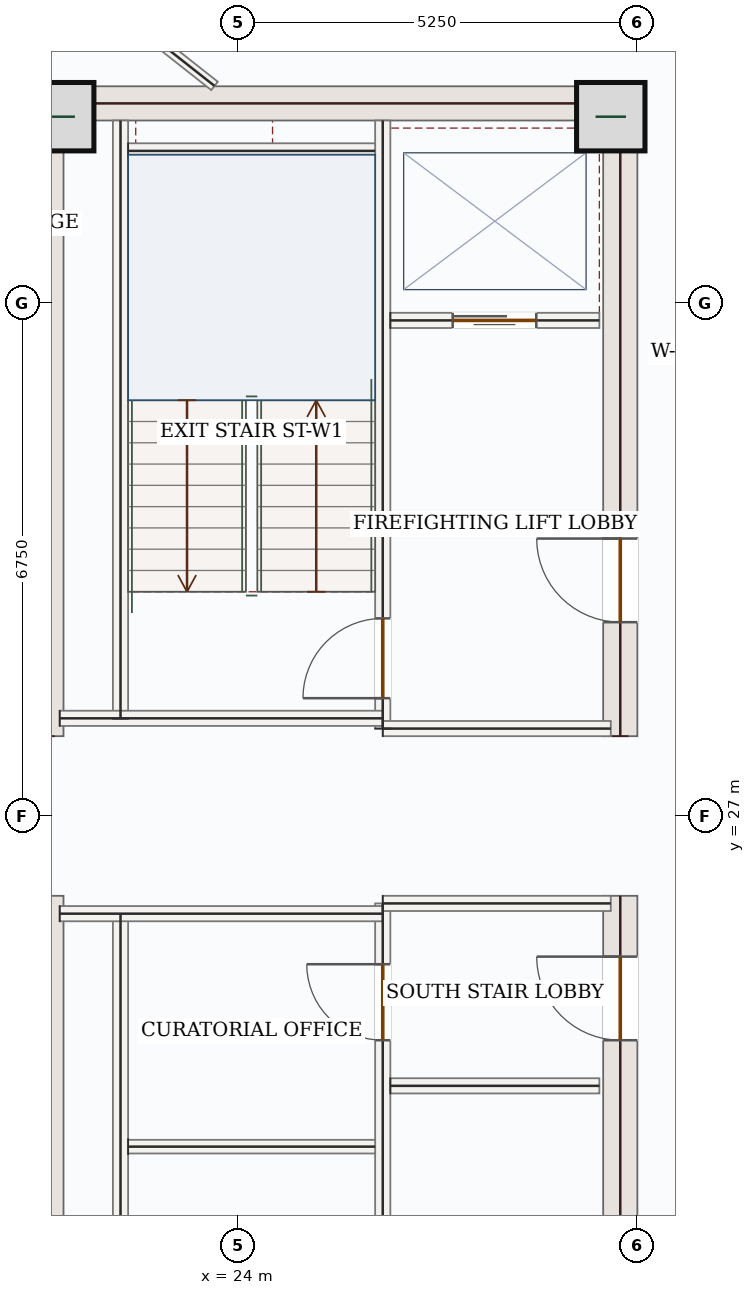
"""IFC4 building model, lengths in metres.
Left out: names, types, materials, properties, quantities, classifications, styles, units other than length and angle.
Written with IfcOpenShell. Run it as: python <this file> out.ifc"""

import sys

from ifc_helpers import new_model, si_unit, direction, frame, frame_2d, origin, origin_2d, place, context, subcontext, project, spatial, rectangle, extrude, source, transform, mapped, element, fill, save


model = new_model("IFC4")
c1 = context("Model", 3, precision=1e-05, world=origin(), true_north=direction((0.0, 1.0)))
c2 = subcontext(c1, "Body", "Model", "MODEL_VIEW")
j1 = project(units=[si_unit("LENGTHUNIT", "METRE"), si_unit("PLANEANGLEUNIT", "RADIAN")], contexts=[c1])
p1 = place(None, origin())
s1 = spatial("IfcSite", under=j1, at=p1, CompositionType="ELEMENT")
p2 = place(p1, origin())
s2 = spatial("IfcBuilding", under=s1, at=p2, CompositionType="ELEMENT")
p3 = place(p2, frame((0.0, 0.0, 327.3)))
s3 = spatial("IfcBuildingStorey", under=s2, at=p3, CompositionType="ELEMENT", Elevation=327.3)
m1 = source(origin(), c2, "Body", "SweptSolid", [
    extrude(rectangle(XDim=8.55, YDim=0.45, at=frame_2d((4.275, 0.0))), origin(), (0.0, 0.0, 1.0), 3.5),
])
for number, where, z_axis, x_axis in (
    (1, (21.475, 17.4, 0.0), (0.0, 0.0, 1.0), (0.0, 1.0, 0.0)),
    (2, (21.475, 28.05, 0.0), (0.0, 0.0, 1.0), (0.0, 1.0, 0.0)),
):
    element("IfcWall", number, at=place(p3, frame(where, z_axis=z_axis, x_axis=x_axis)), inside=s3, PredefinedType="SHEAR", context=c2, shape_type="MappedRepresentation", body=[
        mapped(m1, transform((0.0, 0.0, 0.0), x_axis=(1.0, 0.0, 0.0), y_axis=(0.0, 1.0, 0.0), z_axis=(0.0, 0.0, 1.0), scale=1.0)),
    ])
p4 = place(p3, frame((29.025, 17.4, 0.0), z_axis=(0.0, 0.0, 1.0), x_axis=(0.0, 1.0, 0.0)))
e3 = element("IfcWall", 3, at=p4, inside=s3, PredefinedType="SHEAR", context=c2, shape_type="SweptSolid", body=[
    extrude(rectangle(XDim=8.55, YDim=0.45, at=frame_2d((4.275, 0.0))), origin(), (0.0, 0.0, 1.0), 3.5),
])
p5 = place(p4, frame((6.65, 0.0, 0.0)))
e4 = element("IfcOpeningElement", 4, at=p5, cuts=e3, PredefinedType="OPENING", context=c2, shape_type="SweptSolid", body=[
    extrude(rectangle(XDim=1.1, YDim=2.2, at=frame_2d((0.55, 1.1))), frame((0.0, 0.235, 0.0), z_axis=(0.0, -1.0, 0.0), x_axis=(1.0, 0.0, 0.0)), (0.0, 0.0, 1.0), 0.47),
])
p6 = place(p4, frame((3.15, 0.0, 0.0)))
e5 = element("IfcOpeningElement", 5, at=p6, cuts=e3, PredefinedType="OPENING", context=c2, shape_type="SweptSolid", body=[
    extrude(rectangle(XDim=0.88, YDim=2.1, at=frame_2d((0.44, 1.05))), frame((0.0, 0.235, 0.0), z_axis=(0.0, -1.0, 0.0), x_axis=(1.0, 0.0, 0.0)), (0.0, 0.0, 1.0), 0.47),
])
p7 = place(p3, frame((29.025, 28.05, 0.0), z_axis=(0.0, 0.0, 1.0), x_axis=(0.0, 1.0, 0.0)))
e6 = element("IfcWall", 6, at=p7, inside=s3, PredefinedType="SHEAR", context=c2, shape_type="SweptSolid", body=[
    extrude(rectangle(XDim=8.55, YDim=0.45, at=frame_2d((4.275, 0.0))), origin(), (0.0, 0.0, 1.0), 3.5),
])
p8 = place(p7, frame((1.5, 0.0, 0.0)))
e7 = element("IfcOpeningElement", 7, at=p8, cuts=e6, PredefinedType="OPENING", context=c2, shape_type="SweptSolid", body=[
    extrude(rectangle(XDim=1.1, YDim=2.2, at=frame_2d((0.55, 1.1))), frame((0.0, 0.235, 0.0), z_axis=(0.0, -1.0, 0.0), x_axis=(1.0, 0.0, 0.0)), (0.0, 0.0, 1.0), 0.47),
])
m2 = source(origin(), c2, "Body", "SweptSolid", [
    extrude(rectangle(XDim=7.1, YDim=0.45, at=frame_2d((3.55, 0.0))), origin(), (0.0, 0.0, 1.0), 3.5),
])
p9 = place(p3, frame((21.7, 36.375, 0.0), z_axis=(0.0, 0.0, 1.0), x_axis=(1.0, 0.0, 0.0)))
e8 = element("IfcWall", 8, at=p9, inside=s3, PredefinedType="SHEAR", context=c2, shape_type="MappedRepresentation", body=[
    mapped(m2, transform((0.0, 0.0, 0.0), x_axis=(1.0, 0.0, 0.0), y_axis=(0.0, 1.0, 0.0), z_axis=(0.0, 0.0, 1.0), scale=1.0)),
])
m3 = source(origin(), c2, "Body", "SweptSolid", [
    extrude(rectangle(XDim=0.9, YDim=0.9, at=origin_2d()), origin(), (0.0, 0.0, 1.0), 3.75),
])
for number, where, z_axis, x_axis in (
    (9, (21.65, 36.2, 0.0), (0.0, 0.0, 1.0), (1.0, 0.0, 0.0)),
    (10, (28.9, 36.2, 0.0), (0.0, 0.0, 1.0), (1.0, 0.0, 0.0)),
):
    element("IfcColumn", number, at=place(p3, frame(where, z_axis=z_axis, x_axis=x_axis)), inside=s3, PredefinedType="COLUMN", context=c2, shape_type="MappedRepresentation", body=[
        mapped(m3, transform((0.0, 0.0, 0.0), x_axis=(1.0, 0.0, 0.0), y_axis=(0.0, 1.0, 0.0), z_axis=(0.0, 0.0, 1.0), scale=1.0)),
    ])
p10 = place(p3, frame((18.94, 35.542, 0.0), z_axis=(0.0, 0.0, 1.0), x_axis=(0.707106781187, 0.707106781187, 0.0)))
e11 = element("IfcWall", 11, at=p10, inside=s3, PredefinedType="SOLIDWALL", context=c2, shape_type="SweptSolid", body=[
    extrude(rectangle(XDim=3.963, YDim=0.28, at=frame_2d((1.982, 0.0))), origin(), (0.0, 0.0, 1.0), 3.5),
])
p11 = place(p10, frame((1.232, 0.0, 0.85)))
e12 = element("IfcOpeningElement", 12, at=p11, cuts=e11, PredefinedType="OPENING", context=c2, shape_type="SweptSolid", body=[
    extrude(rectangle(XDim=1.5, YDim=1.5, at=frame_2d((0.75, 0.75))), frame((0.0, 0.15, 0.0), z_axis=(0.0, -1.0, 0.0), x_axis=(1.0, 0.0, 0.0)), (0.0, 0.0, 1.0), 0.3),
])
m4 = source(origin(), c2, "Body", "SweptSolid", [
    extrude(rectangle(XDim=7.87, YDim=0.2, at=frame_2d((3.935, 0.0))), origin(), (0.0, 0.0, 1.0), 3.5),
])
for number, where, z_axis, x_axis in (
    (13, (22.45, 17.85, 0.0), (0.0, 0.0, 1.0), (0.0, 1.0, 0.0)),
    (14, (22.45, 28.28, 0.0), (0.0, 0.0, 1.0), (0.0, 1.0, 0.0)),
):
    element("IfcWall", number, at=place(p3, frame(where, z_axis=z_axis, x_axis=x_axis)), inside=s3, PredefinedType="SOLIDWALL", context=c2, shape_type="MappedRepresentation", body=[
        mapped(m4, transform((0.0, 0.0, 0.0), x_axis=(1.0, 0.0, 0.0), y_axis=(0.0, 1.0, 0.0), z_axis=(0.0, 0.0, 1.0), scale=1.0)),
    ])
p12 = place(p3, frame((25.9, 17.85, 0.0), z_axis=(0.0, 0.0, 1.0), x_axis=(0.0, 1.0, 0.0)))
e15 = element("IfcWall", 15, at=p12, inside=s3, PredefinedType="SOLIDWALL", context=c2, shape_type="SweptSolid", body=[
    extrude(rectangle(XDim=8.0, YDim=0.2, at=frame_2d((4.0, 0.0))), origin(), (0.0, 0.0, 1.0), 3.5),
])
p13 = place(p12, frame((6.2, 0.0, 0.0)))
e16 = element("IfcOpeningElement", 16, at=p13, cuts=e15, PredefinedType="OPENING", context=c2, shape_type="SweptSolid", body=[
    extrude(rectangle(XDim=1.0, YDim=2.15, at=frame_2d((0.5, 1.075))), frame((0.0, 0.11, 0.0), z_axis=(0.0, -1.0, 0.0), x_axis=(1.0, 0.0, 0.0)), (0.0, 0.0, 1.0), 0.22),
])
p14 = place(p12, frame((0.6, 0.0, 0.0)))
e17 = element("IfcOpeningElement", 17, at=p14, cuts=e15, PredefinedType="OPENING", context=c2, shape_type="SweptSolid", body=[
    extrude(rectangle(XDim=0.88, YDim=2.1, at=frame_2d((0.44, 1.05))), frame((0.0, 0.11, 0.0), z_axis=(0.0, -1.0, 0.0), x_axis=(1.0, 0.0, 0.0)), (0.0, 0.0, 1.0), 0.22),
])
p15 = place(p3, frame((25.9, 28.15, 0.0), z_axis=(0.0, 0.0, 1.0), x_axis=(0.0, 1.0, 0.0)))
e18 = element("IfcWall", 18, at=p15, inside=s3, PredefinedType="SOLIDWALL", context=c2, shape_type="SweptSolid", body=[
    extrude(rectangle(XDim=8.0, YDim=0.2, at=frame_2d((4.0, 0.0))), origin(), (0.0, 0.0, 1.0), 3.5),
])
p16 = place(p15, frame((0.4, 0.0, 0.0)))
e19 = element("IfcOpeningElement", 19, at=p16, cuts=e18, PredefinedType="OPENING", context=c2, shape_type="SweptSolid", body=[
    extrude(rectangle(XDim=1.05, YDim=2.15, at=frame_2d((0.525, 1.075))), frame((0.0, 0.11, 0.0), z_axis=(0.0, -1.0, 0.0), x_axis=(1.0, 0.0, 0.0)), (0.0, 0.0, 1.0), 0.22),
])
m5 = source(origin(), c2, "Body", "SweptSolid", [
    extrude(rectangle(XDim=4.25, YDim=0.2, at=frame_2d((2.125, 0.0))), origin(), (0.0, 0.0, 1.0), 3.5),
])
p17 = place(p3, frame((21.65, 25.715, 0.0), z_axis=(0.0, 0.0, 1.0), x_axis=(1.0, 0.0, 0.0)))
e20 = element("IfcWall", 20, at=p17, inside=s3, PredefinedType="SOLIDWALL", context=c2, shape_type="MappedRepresentation", body=[
    mapped(m5, transform((0.0, 0.0, 0.0), x_axis=(1.0, 0.0, 0.0), y_axis=(0.0, 1.0, 0.0), z_axis=(0.0, 0.0, 1.0), scale=1.0)),
])
m6 = source(origin(), c2, "Body", "SweptSolid", [
    extrude(rectangle(XDim=3.0, YDim=0.2, at=frame_2d((1.5, 0.0))), origin(), (0.0, 0.0, 1.0), 3.5),
])
p18 = place(p3, frame((25.9, 25.85, 0.0), z_axis=(0.0, 0.0, 1.0), x_axis=(1.0, 0.0, 0.0)))
e21 = element("IfcWall", 21, at=p18, inside=s3, PredefinedType="SOLIDWALL", context=c2, shape_type="MappedRepresentation", body=[
    mapped(m6, transform((0.0, 0.0, 0.0), x_axis=(1.0, 0.0, 0.0), y_axis=(0.0, 1.0, 0.0), z_axis=(0.0, 0.0, 1.0), scale=1.0)),
])
p19 = place(p3, frame((21.65, 28.285, 0.0), z_axis=(0.0, 0.0, 1.0), x_axis=(1.0, 0.0, 0.0)))
e22 = element("IfcWall", 22, at=p19, inside=s3, PredefinedType="SOLIDWALL", context=c2, shape_type="MappedRepresentation", body=[
    mapped(m5, transform((0.0, 0.0, 0.0), x_axis=(1.0, 0.0, 0.0), y_axis=(0.0, 1.0, 0.0), z_axis=(0.0, 0.0, 1.0), scale=1.0)),
])
p20 = place(p3, frame((25.9, 28.15, 0.0), z_axis=(0.0, 0.0, 1.0), x_axis=(1.0, 0.0, 0.0)))
e23 = element("IfcWall", 23, at=p20, inside=s3, PredefinedType="SOLIDWALL", context=c2, shape_type="MappedRepresentation", body=[
    mapped(m6, transform((0.0, 0.0, 0.0), x_axis=(1.0, 0.0, 0.0), y_axis=(0.0, 1.0, 0.0), z_axis=(0.0, 0.0, 1.0), scale=1.0)),
])
m7 = source(origin(), c2, "Body", "SweptSolid", [
    extrude(rectangle(XDim=3.25, YDim=0.2, at=frame_2d((1.625, 0.0))), origin(), (0.0, 0.0, 1.0), 3.5),
])
p21 = place(p3, frame((22.55, 35.75, 0.0), z_axis=(0.0, 0.0, 1.0), x_axis=(1.0, 0.0, 0.0)))
e24 = element("IfcWall", 24, at=p21, inside=s3, PredefinedType="SOLIDWALL", context=c2, shape_type="MappedRepresentation", body=[
    mapped(m7, transform((0.0, 0.0, 0.0), x_axis=(1.0, 0.0, 0.0), y_axis=(0.0, 1.0, 0.0), z_axis=(0.0, 0.0, 1.0), scale=1.0)),
])
m8 = source(origin(), c2, "Body", "SweptSolid", [
    extrude(rectangle(XDim=3.25, YDim=0.18, at=frame_2d((1.625, 0.0))), origin(), (0.0, 0.0, 1.0), 3.5),
])
p22 = place(p3, frame((22.55, 22.65, 0.0), z_axis=(0.0, 0.0, 1.0), x_axis=(1.0, 0.0, 0.0)))
e25 = element("IfcWall", 25, at=p22, inside=s3, PredefinedType="PARTITIONING", context=c2, shape_type="MappedRepresentation", body=[
    mapped(m8, transform((0.0, 0.0, 0.0), x_axis=(1.0, 0.0, 0.0), y_axis=(0.0, 1.0, 0.0), z_axis=(0.0, 0.0, 1.0), scale=1.0)),
])
p23 = place(p3, frame((26.0, 33.52, 0.0), z_axis=(0.0, 0.0, 1.0), x_axis=(1.0, 0.0, 0.0)))
e26 = element("IfcWall", 26, at=p23, inside=s3, PredefinedType="SOLIDWALL", context=c2, shape_type="SweptSolid", body=[
    extrude(rectangle(XDim=2.75, YDim=0.2, at=frame_2d((1.375, 0.0))), origin(), (0.0, 0.0, 1.0), 3.5),
])
p24 = place(p23, frame((0.82, 0.0, 0.0)))
e27 = element("IfcOpeningElement", 27, at=p24, cuts=e26, PredefinedType="OPENING", context=c2, shape_type="SweptSolid", body=[
    extrude(rectangle(XDim=1.1, YDim=2.15, at=frame_2d((0.55, 1.075))), frame((0.0, 0.11, 0.0), z_axis=(0.0, -1.0, 0.0), x_axis=(1.0, 0.0, 0.0)), (0.0, 0.0, 1.0), 0.22),
])
m9 = source(origin(), c2, "Body", "SweptSolid", [
    extrude(rectangle(XDim=2.75, YDim=0.2, at=frame_2d((1.375, 0.0))), origin(), (0.0, 0.0, 1.0), 3.5),
])
p25 = place(p3, frame((26.0, 23.45, 0.0), z_axis=(0.0, 0.0, 1.0), x_axis=(1.0, 0.0, 0.0)))
e28 = element("IfcWall", 28, at=p25, inside=s3, PredefinedType="SOLIDWALL", context=c2, shape_type="MappedRepresentation", body=[
    mapped(m9, transform((0.0, 0.0, 0.0), x_axis=(1.0, 0.0, 0.0), y_axis=(0.0, 1.0, 0.0), z_axis=(0.0, 0.0, 1.0), scale=1.0)),
])
m10 = source(origin(), c2, "Body", "SweptSolid", [
    extrude(rectangle(XDim=2.477, YDim=0.14, at=frame_2d((1.239, 0.0))), origin(), (0.0, 0.0, 1.0), 3.5),
])
p26 = place(p3, frame((21.742, 38.138, 0.0), z_axis=(0.0, 0.0, 1.0), x_axis=(0.785339198937, -0.619065701371, 0.0)))
e29 = element("IfcWall", 29, at=p26, inside=s3, PredefinedType="PARTITIONING", context=c2, shape_type="MappedRepresentation", body=[
    mapped(m10, transform((0.0, 0.0, 0.0), x_axis=(1.0, 0.0, 0.0), y_axis=(0.0, 1.0, 0.0), z_axis=(0.0, 0.0, 1.0), scale=1.0)),
])
m11 = source(origin(), c2, "Body", "SweptSolid", [
    extrude(rectangle(XDim=1.05, YDim=2.15, at=frame_2d((0.525, 1.075))), frame((0.0, 0.025, 0.0), z_axis=(0.0, -1.0, 0.0), x_axis=(1.0, 0.0, 0.0)), (0.0, 0.0, 1.0), 0.05),
])
p27 = place(p16, origin())
e30 = element("IfcDoor", 30, at=p27, inside=s3, OperationType="SINGLE_SWING_LEFT", PredefinedType="DOOR", context=c2, shape_type="MappedRepresentation", body=[
    mapped(m11, transform((0.0, 0.0, 0.0), x_axis=(1.0, 0.0, 0.0), y_axis=(0.0, 1.0, 0.0), z_axis=(0.0, 0.0, 1.0), scale=1.0)),
])
fill(e19, e30)
m12 = source(origin(), c2, "Body", "SweptSolid", [
    extrude(rectangle(XDim=1.0, YDim=2.15, at=frame_2d((0.5, 1.075))), frame((0.0, 0.025, 0.0), z_axis=(0.0, -1.0, 0.0), x_axis=(1.0, 0.0, 0.0)), (0.0, 0.0, 1.0), 0.05),
])
p28 = place(p13, origin())
e31 = element("IfcDoor", 31, at=p28, inside=s3, OperationType="SINGLE_SWING_RIGHT", PredefinedType="DOOR", context=c2, shape_type="MappedRepresentation", body=[
    mapped(m12, transform((0.0, 0.0, 0.0), x_axis=(1.0, 0.0, 0.0), y_axis=(0.0, 1.0, 0.0), z_axis=(0.0, 0.0, 1.0), scale=1.0)),
])
fill(e16, e31)
m13 = source(origin(), c2, "Body", "SweptSolid", [
    extrude(rectangle(XDim=1.1, YDim=2.15, at=frame_2d((0.55, 1.075))), frame((0.0, 0.025, 0.0), z_axis=(0.0, -1.0, 0.0), x_axis=(1.0, 0.0, 0.0)), (0.0, 0.0, 1.0), 0.05),
])
p29 = place(p24, origin())
e32 = element("IfcDoor", 32, at=p29, inside=s3, OperationType="DOUBLE_DOOR_SLIDING", PredefinedType="DOOR", context=c2, shape_type="MappedRepresentation", body=[
    mapped(m13, transform((0.0, 0.0, 0.0), x_axis=(1.0, 0.0, 0.0), y_axis=(0.0, 1.0, 0.0), z_axis=(0.0, 0.0, 1.0), scale=1.0)),
])
fill(e27, e32)
m14 = source(origin(), c2, "Body", "SweptSolid", [
    extrude(rectangle(XDim=1.1, YDim=2.2, at=frame_2d((0.55, 1.1))), frame((0.0, 0.025, 0.0), z_axis=(0.0, -1.0, 0.0), x_axis=(1.0, 0.0, 0.0)), (0.0, 0.0, 1.0), 0.05),
])
p30 = place(p8, origin())
e33 = element("IfcDoor", 33, at=p30, inside=s3, OperationType="SINGLE_SWING_RIGHT", PredefinedType="DOOR", context=c2, shape_type="MappedRepresentation", body=[
    mapped(m14, transform((0.0, 0.0, 0.0), x_axis=(1.0, 0.0, 0.0), y_axis=(0.0, 1.0, 0.0), z_axis=(0.0, 0.0, 1.0), scale=1.0)),
])
fill(e7, e33)
p31 = place(p5, origin())
e34 = element("IfcDoor", 34, at=p31, inside=s3, OperationType="SINGLE_SWING_RIGHT", PredefinedType="DOOR", context=c2, shape_type="MappedRepresentation", body=[
    mapped(m14, transform((0.0, 0.0, 0.0), x_axis=(1.0, 0.0, 0.0), y_axis=(0.0, 1.0, 0.0), z_axis=(0.0, 0.0, 1.0), scale=1.0)),
])
fill(e4, e34)
save(model, sys.argv[1])
